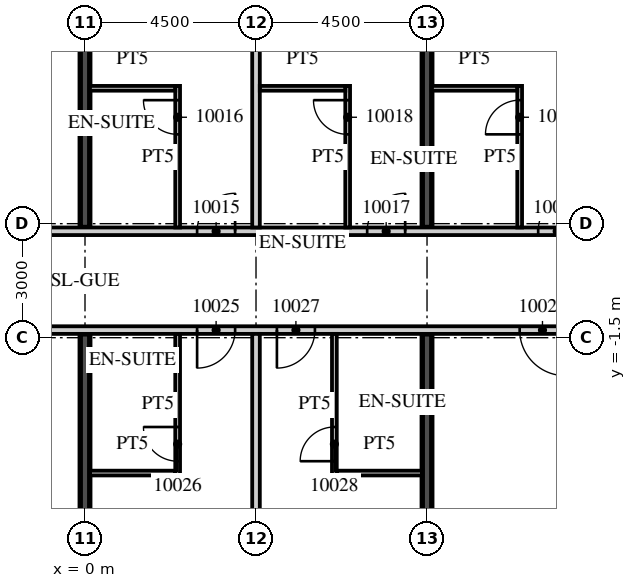
"""IFC4 building model, lengths in metres.
Left out: names, types, materials, properties, quantities, classifications, styles, units other than length and angle.
Written with IfcOpenShell. Run it as: python <this file> out.ifc"""

import sys

from ifc_helpers import new_model, si_unit, direction, frame, frame_2d, origin, place, context, subcontext, project, spatial, rectangle, extrude, element, fill, save


model = new_model("IFC4")
c1 = context("Model", 3, precision=1e-05, world=origin(), true_north=direction((0.0, 1.0)))
c2 = subcontext(c1, "Body", "Model", "MODEL_VIEW")
j1 = project(units=[si_unit("LENGTHUNIT", "METRE"), si_unit("PLANEANGLEUNIT", "RADIAN")], contexts=[c1])
p1 = place(None, origin())
s1 = spatial("IfcSite", under=j1, at=p1, CompositionType="ELEMENT")
p2 = place(p1, origin())
s2 = spatial("IfcBuilding", under=s1, at=p2, CompositionType="ELEMENT")
p3 = place(p2, frame((0.0, 0.0, 63.3)))
s3 = spatial("IfcBuildingStorey", under=s2, at=p3, CompositionType="ELEMENT", Elevation=63.3)
for number, where, z_axis, x_axis in (
    (1, (0.0, -21.54, 0.0), (0.0, 0.0, 1.0), (0.0, 1.0, 0.0)),
    (2, (0.0, 1.4, 0.0), (0.0, 0.0, 1.0), (0.0, 1.0, 0.0)),
    (3, (9.0, -21.54, 0.0), (0.0, 0.0, 1.0), (0.0, 1.0, 0.0)),
    (4, (9.0, 1.4, 0.0), (0.0, 0.0, 1.0), (0.0, 1.0, 0.0)),
):
    element("IfcWall", number, at=place(p3, frame(where, z_axis=z_axis, x_axis=x_axis)), inside=s3, PredefinedType="SHEAR", context=c2, shape_type="SweptSolid", body=[
        extrude(rectangle(XDim=20.14, YDim=0.25, at=frame_2d((10.07, 0.0))), origin(), (0.0, 0.0, 1.0), 3.3),
    ])
p4 = place(p3, frame((-44.55, 1.3, 0.0), z_axis=(0.0, 0.0, 1.0), x_axis=(1.0, 0.0, 0.0)))
e5 = element("IfcWall", 5, at=p4, inside=s3, PredefinedType="PARTITIONING", context=c2, shape_type="SweptSolid", body=[
    extrude(rectangle(XDim=58.05, YDim=0.2, at=frame_2d((29.025, 0.0))), origin(), (0.0, 0.0, 1.0), 3.02),
])
p5 = place(p4, frame((0.525, 0.0, 0.0)))
e6 = element("IfcOpeningElement", 6, at=p5, cuts=e5, PredefinedType="OPENING", context=c2, shape_type="SweptSolid", body=[
    extrude(rectangle(XDim=1.0, YDim=2.1, at=frame_2d((0.5, 1.05))), frame((0.0, 0.11, 0.0), z_axis=(0.0, -1.0, 0.0), x_axis=(1.0, 0.0, 0.0)), (0.0, 0.0, 1.0), 0.22),
])
p6 = place(p4, frame((6.975, 0.0, 0.0)))
e7 = element("IfcOpeningElement", 7, at=p6, cuts=e5, PredefinedType="OPENING", context=c2, shape_type="SweptSolid", body=[
    extrude(rectangle(XDim=1.0, YDim=2.1, at=frame_2d((0.5, 1.05))), frame((0.0, 0.11, 0.0), z_axis=(0.0, -1.0, 0.0), x_axis=(1.0, 0.0, 0.0)), (0.0, 0.0, 1.0), 0.22),
])
p7 = place(p4, frame((10.987, 0.0, 0.0)))
e8 = element("IfcOpeningElement", 8, at=p7, cuts=e5, PredefinedType="OPENING", context=c2, shape_type="SweptSolid", body=[
    extrude(rectangle(XDim=1.2, YDim=2.1, at=frame_2d((0.6, 1.05))), frame((0.0, 0.11, 0.0), z_axis=(0.0, -1.0, 0.0), x_axis=(1.0, 0.0, 0.0)), (0.0, 0.0, 1.0), 0.22),
])
p8 = place(p4, frame((19.987, 0.0, 0.0)))
e9 = element("IfcOpeningElement", 9, at=p8, cuts=e5, PredefinedType="OPENING", context=c2, shape_type="SweptSolid", body=[
    extrude(rectangle(XDim=1.2, YDim=2.1, at=frame_2d((0.6, 1.05))), frame((0.0, 0.11, 0.0), z_axis=(0.0, -1.0, 0.0), x_axis=(1.0, 0.0, 0.0)), (0.0, 0.0, 1.0), 0.22),
])
p9 = place(p4, frame((29.5, 0.0, 0.0)))
e10 = element("IfcOpeningElement", 10, at=p9, cuts=e5, PredefinedType="OPENING", context=c2, shape_type="SweptSolid", body=[
    extrude(rectangle(XDim=1.0, YDim=2.1, at=frame_2d((0.5, 1.05))), frame((0.0, 0.11, 0.0), z_axis=(0.0, -1.0, 0.0), x_axis=(1.0, 0.0, 0.0)), (0.0, 0.0, 1.0), 0.22),
])
p10 = place(p4, frame((33.975, 0.0, 0.0)))
e11 = element("IfcOpeningElement", 11, at=p10, cuts=e5, PredefinedType="OPENING", context=c2, shape_type="SweptSolid", body=[
    extrude(rectangle(XDim=1.0, YDim=2.1, at=frame_2d((0.5, 1.05))), frame((0.0, 0.11, 0.0), z_axis=(0.0, -1.0, 0.0), x_axis=(1.0, 0.0, 0.0)), (0.0, 0.0, 1.0), 0.22),
])
p11 = place(p4, frame((40.912, 0.0, 0.0)))
e12 = element("IfcOpeningElement", 12, at=p11, cuts=e5, PredefinedType="OPENING", context=c2, shape_type="SweptSolid", body=[
    extrude(rectangle(XDim=1.2, YDim=2.1, at=frame_2d((0.6, 1.05))), frame((0.0, 0.11, 0.0), z_axis=(0.0, -1.0, 0.0), x_axis=(1.0, 0.0, 0.0)), (0.0, 0.0, 1.0), 0.22),
])
p12 = place(p4, frame((47.5, 0.0, 0.0)))
e13 = element("IfcOpeningElement", 13, at=p12, cuts=e5, PredefinedType="OPENING", context=c2, shape_type="SweptSolid", body=[
    extrude(rectangle(XDim=1.0, YDim=2.1, at=frame_2d((0.5, 1.05))), frame((0.0, 0.11, 0.0), z_axis=(0.0, -1.0, 0.0), x_axis=(1.0, 0.0, 0.0)), (0.0, 0.0, 1.0), 0.22),
])
p13 = place(p4, frame((51.975, 0.0, 0.0)))
e14 = element("IfcOpeningElement", 14, at=p13, cuts=e5, PredefinedType="OPENING", context=c2, shape_type="SweptSolid", body=[
    extrude(rectangle(XDim=1.0, YDim=2.1, at=frame_2d((0.5, 1.05))), frame((0.0, 0.11, 0.0), z_axis=(0.0, -1.0, 0.0), x_axis=(1.0, 0.0, 0.0)), (0.0, 0.0, 1.0), 0.22),
])
p14 = place(p4, frame((56.475, 0.0, 0.0)))
e15 = element("IfcOpeningElement", 15, at=p14, cuts=e5, PredefinedType="OPENING", context=c2, shape_type="SweptSolid", body=[
    extrude(rectangle(XDim=1.0, YDim=2.1, at=frame_2d((0.5, 1.05))), frame((0.0, 0.11, 0.0), z_axis=(0.0, -1.0, 0.0), x_axis=(1.0, 0.0, 0.0)), (0.0, 0.0, 1.0), 0.22),
])
p15 = place(p3, frame((4.5, 1.4, 0.0), z_axis=(0.0, 0.0, 1.0), x_axis=(0.0, 1.0, 0.0)))
e16 = element("IfcWall", 16, at=p15, inside=s3, PredefinedType="PARTITIONING", context=c2, shape_type="SweptSolid", body=[
    extrude(rectangle(XDim=20.15, YDim=0.2, at=frame_2d((10.075, 0.0))), origin(), (0.0, 0.0, 1.0), 3.02),
])
p16 = place(p3, frame((2.438, 1.4, 0.0), z_axis=(0.0, 0.0, 1.0), x_axis=(0.0, 1.0, 0.0)))
e17 = element("IfcWall", 17, at=p16, inside=s3, PredefinedType="PARTITIONING", context=c2, shape_type="SweptSolid", body=[
    extrude(rectangle(XDim=3.725, YDim=0.125, at=frame_2d((1.863, 0.0))), origin(), (0.0, 0.0, 1.0), 3.02),
])
p17 = place(p16, frame((2.45, 0.0, 0.0)))
e18 = element("IfcOpeningElement", 18, at=p17, cuts=e17, PredefinedType="OPENING", context=c2, shape_type="SweptSolid", body=[
    extrude(rectangle(XDim=0.9, YDim=2.1, at=frame_2d((0.45, 1.05))), frame((0.0, 0.073, 0.0), z_axis=(0.0, -1.0, 0.0), x_axis=(1.0, 0.0, 0.0)), (0.0, 0.0, 1.0), 0.145),
])
p18 = place(p3, frame((0.125, 5.062, 0.0), z_axis=(0.0, 0.0, 1.0), x_axis=(1.0, 0.0, 0.0)))
e19 = element("IfcWall", 19, at=p18, inside=s3, PredefinedType="PARTITIONING", context=c2, shape_type="SweptSolid", body=[
    extrude(rectangle(XDim=2.25, YDim=0.125, at=frame_2d((1.125, 0.0))), origin(), (0.0, 0.0, 1.0), 3.02),
])
p19 = place(p3, frame((6.912, 1.4, 0.0), z_axis=(0.0, 0.0, 1.0), x_axis=(0.0, 1.0, 0.0)))
e20 = element("IfcWall", 20, at=p19, inside=s3, PredefinedType="PARTITIONING", context=c2, shape_type="SweptSolid", body=[
    extrude(rectangle(XDim=3.725, YDim=0.125, at=frame_2d((1.863, 0.0))), origin(), (0.0, 0.0, 1.0), 3.02),
])
p20 = place(p19, frame((2.45, 0.0, 0.0)))
e21 = element("IfcOpeningElement", 21, at=p20, cuts=e20, PredefinedType="OPENING", context=c2, shape_type="SweptSolid", body=[
    extrude(rectangle(XDim=0.9, YDim=2.1, at=frame_2d((0.45, 1.05))), frame((0.0, 0.073, 0.0), z_axis=(0.0, -1.0, 0.0), x_axis=(1.0, 0.0, 0.0)), (0.0, 0.0, 1.0), 0.145),
])
p21 = place(p3, frame((4.6, 5.062, 0.0), z_axis=(0.0, 0.0, 1.0), x_axis=(1.0, 0.0, 0.0)))
e22 = element("IfcWall", 22, at=p21, inside=s3, PredefinedType="PARTITIONING", context=c2, shape_type="SweptSolid", body=[
    extrude(rectangle(XDim=2.25, YDim=0.125, at=frame_2d((1.125, 0.0))), origin(), (0.0, 0.0, 1.0), 3.02),
])
p22 = place(p3, frame((11.438, 1.4, 0.0), z_axis=(0.0, 0.0, 1.0), x_axis=(0.0, 1.0, 0.0)))
e23 = element("IfcWall", 23, at=p22, inside=s3, PredefinedType="PARTITIONING", context=c2, shape_type="SweptSolid", body=[
    extrude(rectangle(XDim=3.725, YDim=0.125, at=frame_2d((1.863, 0.0))), origin(), (0.0, 0.0, 1.0), 3.02),
])
p23 = place(p22, frame((2.45, 0.0, 0.0)))
e24 = element("IfcOpeningElement", 24, at=p23, cuts=e23, PredefinedType="OPENING", context=c2, shape_type="SweptSolid", body=[
    extrude(rectangle(XDim=0.9, YDim=2.1, at=frame_2d((0.45, 1.05))), frame((0.0, 0.073, 0.0), z_axis=(0.0, -1.0, 0.0), x_axis=(1.0, 0.0, 0.0)), (0.0, 0.0, 1.0), 0.145),
])
p24 = place(p3, frame((9.125, 5.062, 0.0), z_axis=(0.0, 0.0, 1.0), x_axis=(1.0, 0.0, 0.0)))
e25 = element("IfcWall", 25, at=p24, inside=s3, PredefinedType="PARTITIONING", context=c2, shape_type="SweptSolid", body=[
    extrude(rectangle(XDim=2.25, YDim=0.125, at=frame_2d((1.125, 0.0))), origin(), (0.0, 0.0, 1.0), 3.02),
])
p25 = place(p3, frame((-13.5, -1.3, 0.0), z_axis=(0.0, 0.0, 1.0), x_axis=(1.0, 0.0, 0.0)))
e26 = element("IfcWall", 26, at=p25, inside=s3, PredefinedType="PARTITIONING", context=c2, shape_type="SweptSolid", body=[
    extrude(rectangle(XDim=58.05, YDim=0.2, at=frame_2d((29.025, 0.0))), origin(), (0.0, 0.0, 1.0), 3.02),
])
p26 = place(p25, frame((2.925, 0.0, 0.0)))
e27 = element("IfcOpeningElement", 27, at=p26, cuts=e26, PredefinedType="OPENING", context=c2, shape_type="SweptSolid", body=[
    extrude(rectangle(XDim=1.0, YDim=2.1, at=frame_2d((0.5, 1.05))), frame((0.0, 0.11, 0.0), z_axis=(0.0, -1.0, 0.0), x_axis=(1.0, 0.0, 0.0)), (0.0, 0.0, 1.0), 0.22),
])
p27 = place(p25, frame((9.863, 0.0, 0.0)))
e28 = element("IfcOpeningElement", 28, at=p27, cuts=e26, PredefinedType="OPENING", context=c2, shape_type="SweptSolid", body=[
    extrude(rectangle(XDim=1.2, YDim=2.1, at=frame_2d((0.6, 1.05))), frame((0.0, 0.11, 0.0), z_axis=(0.0, -1.0, 0.0), x_axis=(1.0, 0.0, 0.0)), (0.0, 0.0, 1.0), 0.22),
])
p28 = place(p25, frame((16.45, 0.0, 0.0)))
e29 = element("IfcOpeningElement", 29, at=p28, cuts=e26, PredefinedType="OPENING", context=c2, shape_type="SweptSolid", body=[
    extrude(rectangle(XDim=1.0, YDim=2.1, at=frame_2d((0.5, 1.05))), frame((0.0, 0.11, 0.0), z_axis=(0.0, -1.0, 0.0), x_axis=(1.0, 0.0, 0.0)), (0.0, 0.0, 1.0), 0.22),
])
p29 = place(p25, frame((18.55, 0.0, 0.0)))
e30 = element("IfcOpeningElement", 30, at=p29, cuts=e26, PredefinedType="OPENING", context=c2, shape_type="SweptSolid", body=[
    extrude(rectangle(XDim=1.0, YDim=2.1, at=frame_2d((0.5, 1.05))), frame((0.0, 0.11, 0.0), z_axis=(0.0, -1.0, 0.0), x_axis=(1.0, 0.0, 0.0)), (0.0, 0.0, 1.0), 0.22),
])
p30 = place(p25, frame((24.938, 0.0, 0.0)))
e31 = element("IfcOpeningElement", 31, at=p30, cuts=e26, PredefinedType="OPENING", context=c2, shape_type="SweptSolid", body=[
    extrude(rectangle(XDim=1.2, YDim=2.1, at=frame_2d((0.6, 1.05))), frame((0.0, 0.11, 0.0), z_axis=(0.0, -1.0, 0.0), x_axis=(1.0, 0.0, 0.0)), (0.0, 0.0, 1.0), 0.22),
])
p31 = place(p25, frame((33.938, 0.0, 0.0)))
e32 = element("IfcOpeningElement", 32, at=p31, cuts=e26, PredefinedType="OPENING", context=c2, shape_type="SweptSolid", body=[
    extrude(rectangle(XDim=1.2, YDim=2.1, at=frame_2d((0.6, 1.05))), frame((0.0, 0.11, 0.0), z_axis=(0.0, -1.0, 0.0), x_axis=(1.0, 0.0, 0.0)), (0.0, 0.0, 1.0), 0.22),
])
p32 = place(p25, frame((42.938, 0.0, 0.0)))
e33 = element("IfcOpeningElement", 33, at=p32, cuts=e26, PredefinedType="OPENING", context=c2, shape_type="SweptSolid", body=[
    extrude(rectangle(XDim=1.2, YDim=2.1, at=frame_2d((0.6, 1.05))), frame((0.0, 0.11, 0.0), z_axis=(0.0, -1.0, 0.0), x_axis=(1.0, 0.0, 0.0)), (0.0, 0.0, 1.0), 0.22),
])
p33 = place(p25, frame((52.425, 0.0, 0.0)))
e34 = element("IfcOpeningElement", 34, at=p33, cuts=e26, PredefinedType="OPENING", context=c2, shape_type="SweptSolid", body=[
    extrude(rectangle(XDim=1.0, YDim=2.1, at=frame_2d((0.5, 1.05))), frame((0.0, 0.11, 0.0), z_axis=(0.0, -1.0, 0.0), x_axis=(1.0, 0.0, 0.0)), (0.0, 0.0, 1.0), 0.22),
])
p34 = place(p25, frame((56.525, 0.0, 0.0)))
e35 = element("IfcOpeningElement", 35, at=p34, cuts=e26, PredefinedType="OPENING", context=c2, shape_type="SweptSolid", body=[
    extrude(rectangle(XDim=1.0, YDim=2.1, at=frame_2d((0.5, 1.05))), frame((0.0, 0.11, 0.0), z_axis=(0.0, -1.0, 0.0), x_axis=(1.0, 0.0, 0.0)), (0.0, 0.0, 1.0), 0.22),
])
p35 = place(p3, frame((4.5, -21.55, 0.0), z_axis=(0.0, 0.0, 1.0), x_axis=(0.0, 1.0, 0.0)))
e36 = element("IfcWall", 36, at=p35, inside=s3, PredefinedType="PARTITIONING", context=c2, shape_type="SweptSolid", body=[
    extrude(rectangle(XDim=20.15, YDim=0.2, at=frame_2d((10.075, 0.0))), origin(), (0.0, 0.0, 1.0), 3.02),
])
p36 = place(p3, frame((2.438, -5.125, 0.0), z_axis=(0.0, 0.0, 1.0), x_axis=(0.0, 1.0, 0.0)))
e37 = element("IfcWall", 37, at=p36, inside=s3, PredefinedType="PARTITIONING", context=c2, shape_type="SweptSolid", body=[
    extrude(rectangle(XDim=3.725, YDim=0.125, at=frame_2d((1.863, 0.0))), origin(), (0.0, 0.0, 1.0), 3.02),
])
p37 = place(p36, frame((0.375, 0.0, 0.0)))
e38 = element("IfcOpeningElement", 38, at=p37, cuts=e37, PredefinedType="OPENING", context=c2, shape_type="SweptSolid", body=[
    extrude(rectangle(XDim=0.9, YDim=2.1, at=frame_2d((0.45, 1.05))), frame((0.0, 0.073, 0.0), z_axis=(0.0, -1.0, 0.0), x_axis=(1.0, 0.0, 0.0)), (0.0, 0.0, 1.0), 0.145),
])
p38 = place(p3, frame((0.125, -5.062, 0.0), z_axis=(0.0, 0.0, 1.0), x_axis=(1.0, 0.0, 0.0)))
e39 = element("IfcWall", 39, at=p38, inside=s3, PredefinedType="PARTITIONING", context=c2, shape_type="SweptSolid", body=[
    extrude(rectangle(XDim=2.25, YDim=0.125, at=frame_2d((1.125, 0.0))), origin(), (0.0, 0.0, 1.0), 3.02),
])
p39 = place(p3, frame((6.562, -5.125, 0.0), z_axis=(0.0, 0.0, 1.0), x_axis=(0.0, 1.0, 0.0)))
e40 = element("IfcWall", 40, at=p39, inside=s3, PredefinedType="PARTITIONING", context=c2, shape_type="SweptSolid", body=[
    extrude(rectangle(XDim=3.725, YDim=0.125, at=frame_2d((1.863, 0.0))), origin(), (0.0, 0.0, 1.0), 3.02),
])
p40 = place(p39, frame((0.375, 0.0, 0.0)))
e41 = element("IfcOpeningElement", 41, at=p40, cuts=e40, PredefinedType="OPENING", context=c2, shape_type="SweptSolid", body=[
    extrude(rectangle(XDim=0.9, YDim=2.1, at=frame_2d((0.45, 1.05))), frame((0.0, 0.073, 0.0), z_axis=(0.0, -1.0, 0.0), x_axis=(1.0, 0.0, 0.0)), (0.0, 0.0, 1.0), 0.145),
])
p41 = place(p3, frame((6.625, -5.062, 0.0), z_axis=(0.0, 0.0, 1.0), x_axis=(1.0, 0.0, 0.0)))
e42 = element("IfcWall", 42, at=p41, inside=s3, PredefinedType="PARTITIONING", context=c2, shape_type="SweptSolid", body=[
    extrude(rectangle(XDim=2.25, YDim=0.125, at=frame_2d((1.125, 0.0))), origin(), (0.0, 0.0, 1.0), 3.02),
])
p42 = place(p12, origin())
e43 = element("IfcDoor", 43, at=p42, inside=s3, OperationType="SINGLE_SWING_RIGHT", PredefinedType="DOOR", context=c2, shape_type="SweptSolid", body=[
    extrude(rectangle(XDim=1.0, YDim=2.1, at=frame_2d((0.5, 1.05))), frame((0.0, 0.025, 0.0), z_axis=(0.0, -1.0, 0.0), x_axis=(1.0, 0.0, 0.0)), (0.0, 0.0, 1.0), 0.05),
])
fill(e13, e43)
p43 = place(p17, origin())
e44 = element("IfcDoor", 44, at=p43, inside=s3, OperationType="SINGLE_SWING_RIGHT", PredefinedType="DOOR", context=c2, shape_type="SweptSolid", body=[
    extrude(rectangle(XDim=0.9, YDim=2.1, at=frame_2d((0.45, 1.05))), frame((0.0, 0.025, 0.0), z_axis=(0.0, -1.0, 0.0), x_axis=(1.0, 0.0, 0.0)), (0.0, 0.0, 1.0), 0.05),
])
fill(e18, e44)
p44 = place(p13, origin())
e45 = element("IfcDoor", 45, at=p44, inside=s3, OperationType="SINGLE_SWING_RIGHT", PredefinedType="DOOR", context=c2, shape_type="SweptSolid", body=[
    extrude(rectangle(XDim=1.0, YDim=2.1, at=frame_2d((0.5, 1.05))), frame((0.0, 0.025, 0.0), z_axis=(0.0, -1.0, 0.0), x_axis=(1.0, 0.0, 0.0)), (0.0, 0.0, 1.0), 0.05),
])
fill(e14, e45)
p45 = place(p20, origin())
e46 = element("IfcDoor", 46, at=p45, inside=s3, OperationType="SINGLE_SWING_RIGHT", PredefinedType="DOOR", context=c2, shape_type="SweptSolid", body=[
    extrude(rectangle(XDim=0.9, YDim=2.1, at=frame_2d((0.45, 1.05))), frame((0.0, 0.025, 0.0), z_axis=(0.0, -1.0, 0.0), x_axis=(1.0, 0.0, 0.0)), (0.0, 0.0, 1.0), 0.05),
])
fill(e21, e46)
p46 = place(p14, origin())
e47 = element("IfcDoor", 47, at=p46, inside=s3, OperationType="SINGLE_SWING_RIGHT", PredefinedType="DOOR", context=c2, shape_type="SweptSolid", body=[
    extrude(rectangle(XDim=1.0, YDim=2.1, at=frame_2d((0.5, 1.05))), frame((0.0, 0.025, 0.0), z_axis=(0.0, -1.0, 0.0), x_axis=(1.0, 0.0, 0.0)), (0.0, 0.0, 1.0), 0.05),
])
fill(e15, e47)
p47 = place(p23, origin())
e48 = element("IfcDoor", 48, at=p47, inside=s3, OperationType="SINGLE_SWING_LEFT", PredefinedType="DOOR", context=c2, shape_type="SweptSolid", body=[
    extrude(rectangle(XDim=0.9, YDim=2.1, at=frame_2d((0.45, 1.05))), frame((0.0, 0.025, 0.0), z_axis=(0.0, -1.0, 0.0), x_axis=(1.0, 0.0, 0.0)), (0.0, 0.0, 1.0), 0.05),
])
fill(e24, e48)
p48 = place(p28, origin())
e49 = element("IfcDoor", 49, at=p48, inside=s3, OperationType="SINGLE_SWING_LEFT", PredefinedType="DOOR", context=c2, shape_type="SweptSolid", body=[
    extrude(rectangle(XDim=1.0, YDim=2.1, at=frame_2d((0.5, 1.05))), frame((0.0, 0.025, 0.0), z_axis=(0.0, -1.0, 0.0), x_axis=(1.0, 0.0, 0.0)), (0.0, 0.0, 1.0), 0.05),
])
fill(e29, e49)
p49 = place(p37, origin())
e50 = element("IfcDoor", 50, at=p49, inside=s3, OperationType="SINGLE_SWING_RIGHT", PredefinedType="DOOR", context=c2, shape_type="SweptSolid", body=[
    extrude(rectangle(XDim=0.9, YDim=2.1, at=frame_2d((0.45, 1.05))), frame((0.0, 0.025, 0.0), z_axis=(0.0, -1.0, 0.0), x_axis=(1.0, 0.0, 0.0)), (0.0, 0.0, 1.0), 0.05),
])
fill(e38, e50)
p50 = place(p29, origin())
e51 = element("IfcDoor", 51, at=p50, inside=s3, OperationType="SINGLE_SWING_LEFT", PredefinedType="DOOR", context=c2, shape_type="SweptSolid", body=[
    extrude(rectangle(XDim=1.0, YDim=2.1, at=frame_2d((0.5, 1.05))), frame((0.0, 0.025, 0.0), z_axis=(0.0, -1.0, 0.0), x_axis=(1.0, 0.0, 0.0)), (0.0, 0.0, 1.0), 0.05),
])
fill(e30, e51)
p51 = place(p40, origin())
e52 = element("IfcDoor", 52, at=p51, inside=s3, OperationType="SINGLE_SWING_LEFT", PredefinedType="DOOR", context=c2, shape_type="SweptSolid", body=[
    extrude(rectangle(XDim=0.9, YDim=2.1, at=frame_2d((0.45, 1.05))), frame((0.0, 0.025, 0.0), z_axis=(0.0, -1.0, 0.0), x_axis=(1.0, 0.0, 0.0)), (0.0, 0.0, 1.0), 0.05),
])
fill(e41, e52)
p52 = place(p30, origin())
e53 = element("IfcDoor", 53, at=p52, inside=s3, OperationType="SINGLE_SWING_RIGHT", PredefinedType="DOOR", context=c2, shape_type="SweptSolid", body=[
    extrude(rectangle(XDim=1.2, YDim=2.1, at=frame_2d((0.6, 1.05))), frame((0.0, 0.025, 0.0), z_axis=(0.0, -1.0, 0.0), x_axis=(1.0, 0.0, 0.0)), (0.0, 0.0, 1.0), 0.05),
])
fill(e31, e53)
save(model, sys.argv[1])
